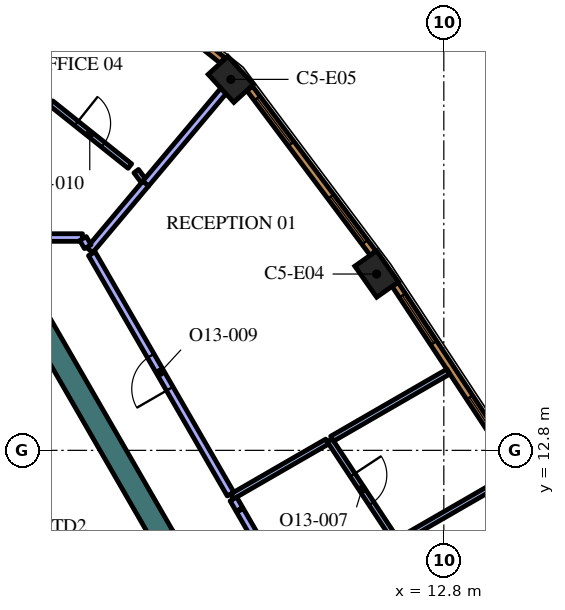
"""IFC4 building model, lengths in metres.
Left out: names, types, materials, properties, quantities, classifications, styles, units other than length and angle.
Written with IfcOpenShell. Run it as: python <this file> out.ifc"""

import sys

from ifc_helpers import new_model, si_unit, direction, frame, frame_2d, origin, origin_2d, place, context, subcontext, project, spatial, rectangle, extrude, element, fill, save


model = new_model("IFC4")
c1 = context("Model", 3, precision=1e-05, world=origin(), true_north=direction((0.0, 1.0)))
c2 = subcontext(c1, "Body", "Model", "MODEL_VIEW")
j1 = project(units=[si_unit("LENGTHUNIT", "METRE"), si_unit("PLANEANGLEUNIT", "RADIAN")], contexts=[c1])
p1 = place(None, origin())
s1 = spatial("IfcSite", under=j1, at=p1, CompositionType="ELEMENT")
p2 = place(p1, origin())
s2 = spatial("IfcBuilding", under=s1, at=p2, CompositionType="ELEMENT")
p3 = place(p2, frame((0.0, 0.0, 300.6)))
s3 = spatial("IfcBuildingStorey", under=s2, at=p3, CompositionType="ELEMENT", Elevation=300.6)
for number, where, z_axis, x_axis in (
    (1, (11.032, 17.44, 0.0), (0.0, 0.0, 1.0), (-0.575, 0.818, 0.0)),
    (2, (7.195, 22.561, 0.0), (0.0, 0.0, 1.0), (-0.676, 0.737, 0.0)),
):
    element("IfcColumn", number, at=place(p3, frame(where, z_axis=z_axis, x_axis=x_axis)), inside=s3, PredefinedType="COLUMN", context=c2, shape_type="SweptSolid", body=[
        extrude(rectangle(XDim=1.0, YDim=0.7, at=origin_2d()), origin(), (0.0, 0.0, 1.0), 4.2),
    ])
p4 = place(p3, frame((1.989, 16.456, 0.0), z_axis=(0.0, 0.0, 1.0), x_axis=(0.499973159588, -0.866040899549, 0.0)))
e3 = element("IfcWall", 3, at=p4, inside=s3, PredefinedType="SOLIDWALL", context=c2, shape_type="SweptSolid", body=[
    extrude(rectangle(XDim=6.828, YDim=0.6, at=frame_2d((3.414, 0.0))), origin(), (0.0, 0.0, 1.0), 4.2),
])
p5 = place(p3, frame((11.564, 10.387, 0.0), z_axis=(0.0, 0.0, 1.0), x_axis=(0.86604641216, 0.499963610661, 0.0)))
e4 = element("IfcWall", 4, at=p5, inside=s3, PredefinedType="PARTITIONING", context=c2, shape_type="SweptSolid", body=[
    extrude(rectangle(XDim=3.096, YDim=0.15, at=frame_2d((1.548, 0.0))), origin(), (0.0, 0.0, 1.0), 3.55),
])
p6 = place(p3, frame((9.795, 13.068, 0.0), z_axis=(0.0, 0.0, 1.0), x_axis=(0.550767347659, -0.834658809786, 0.0)))
e5 = element("IfcWall", 5, at=p6, inside=s3, PredefinedType="PARTITIONING", context=c2, shape_type="SweptSolid", body=[
    extrude(rectangle(XDim=2.999, YDim=0.15, at=frame_2d((1.5, 0.0))), origin(), (0.0, 0.0, 1.0), 3.55),
])
p7 = place(p6, frame((1.099, 0.0, 0.0)))
e6 = element("IfcOpeningElement", 6, at=p7, cuts=e5, PredefinedType="OPENING", context=c2, shape_type="SweptSolid", body=[
    extrude(rectangle(XDim=0.9, YDim=2.1, at=frame_2d((0.45, 1.05))), frame((0.0, 0.085, 0.0), z_axis=(0.0, -1.0, 0.0), x_axis=(1.0, 0.0, 0.0)), (0.0, 0.0, 1.0), 0.17),
])
p8 = place(p3, frame((9.86, 13.106, 0.0), z_axis=(0.0, 0.0, 1.0), x_axis=(0.866022094817, 0.500005731256, 0.0)))
e7 = element("IfcWall", 7, at=p8, inside=s3, PredefinedType="PARTITIONING", context=c2, shape_type="SweptSolid", body=[
    extrude(rectangle(XDim=3.531, YDim=0.15, at=frame_2d((1.766, 0.0))), origin(), (0.0, 0.0, 1.0), 3.55),
])
p9 = place(p3, frame((7.226, 11.585, 0.0), z_axis=(0.0, 0.0, 1.0), x_axis=(0.866021079084, 0.500007490527, 0.0)))
e8 = element("IfcWall", 8, at=p9, inside=s3, PredefinedType="PARTITIONING", context=c2, shape_type="SweptSolid", body=[
    extrude(rectangle(XDim=2.892, YDim=0.15, at=frame_2d((1.446, 0.0))), origin(), (0.0, 0.0, 1.0), 3.55),
])
p10 = place(p3, frame((13.436, 0.829, 0.0), z_axis=(0.0, 0.0, 1.0), x_axis=(-0.49999894854, 0.866026010844, 0.0)))
e9 = element("IfcWall", 9, at=p10, inside=s3, PredefinedType="PARTITIONING", context=c2, shape_type="SweptSolid", body=[
    extrude(rectangle(XDim=12.0, YDim=0.2, at=frame_2d((6.0, 0.0))), origin(), (0.0, 0.0, 1.0), 3.55),
])
p11 = place(p10, frame((5.5, 0.0, 0.0)))
e10 = element("IfcOpeningElement", 10, at=p11, cuts=e9, PredefinedType="OPENING", context=c2, shape_type="SweptSolid", body=[
    extrude(rectangle(XDim=1.0, YDim=2.1, at=frame_2d((0.5, 1.05))), frame((0.0, 0.11, 0.0), z_axis=(0.0, -1.0, 0.0), x_axis=(1.0, 0.0, 0.0)), (0.0, 0.0, 1.0), 0.22),
])
p12 = place(p3, frame((7.421, 11.247, 0.0), z_axis=(0.0, 0.0, 1.0), x_axis=(-0.500303403544, 0.865850162789, 0.0)))
e11 = element("IfcWall", 11, at=p12, inside=s3, PredefinedType="PARTITIONING", context=c2, shape_type="SweptSolid", body=[
    extrude(rectangle(XDim=0.315, YDim=0.2, at=frame_2d((0.158, 0.0))), origin(), (0.0, 0.0, 1.0), 3.55),
])
p13 = place(p3, frame((4.95, 19.814, 0.0), z_axis=(0.0, 0.0, 1.0), x_axis=(0.642981953866, 0.765881326971, 0.0)))
e12 = element("IfcWall", 12, at=p13, inside=s3, PredefinedType="PARTITIONING", context=c2, shape_type="SweptSolid", body=[
    extrude(rectangle(XDim=3.188, YDim=0.2, at=frame_2d((1.594, 0.0))), origin(), (0.0, 0.0, 1.0), 3.55),
])
p14 = place(p3, frame((3.483, 18.067, 0.0), z_axis=(0.0, 0.0, 1.0), x_axis=(0.642896944312, 0.765952687177, 0.0)))
e13 = element("IfcWall", 13, at=p14, inside=s3, PredefinedType="PARTITIONING", context=c2, shape_type="SweptSolid", body=[
    extrude(rectangle(XDim=2.29, YDim=0.2, at=frame_2d((1.145, 0.0))), origin(), (0.0, 0.0, 1.0), 3.55),
])
p15 = place(p3, frame((7.188, 11.65, 0.0), z_axis=(0.0, 0.0, 1.0), x_axis=(-0.499989634868, 0.866031388014, 0.0)))
e14 = element("IfcWall", 14, at=p15, inside=s3, PredefinedType="PARTITIONING", context=c2, shape_type="SweptSolid", body=[
    extrude(rectangle(XDim=7.303, YDim=0.2, at=frame_2d((3.652, 0.0))), origin(), (0.0, 0.0, 1.0), 3.55),
])
p16 = place(p15, frame((3.2, 0.0, 0.0)))
e15 = element("IfcOpeningElement", 15, at=p16, cuts=e14, PredefinedType="OPENING", context=c2, shape_type="SweptSolid", body=[
    extrude(rectangle(XDim=1.0, YDim=2.1, at=frame_2d((0.5, 1.05))), frame((0.0, 0.11, 0.0), z_axis=(0.0, -1.0, 0.0), x_axis=(1.0, 0.0, 0.0)), (0.0, 0.0, 1.0), 0.22),
])
p17 = place(p3, frame((4.891, 19.899, 0.0), z_axis=(0.0, 0.0, 1.0), x_axis=(-0.6, 0.8, 0.0)))
e16 = element("IfcWall", 16, at=p17, inside=s3, PredefinedType="PARTITIONING", context=c2, shape_type="SweptSolid", body=[
    extrude(rectangle(XDim=0.309, YDim=0.15, at=frame_2d((0.154, 0.0))), origin(), (0.0, 0.0, 1.0), 3.55),
])
p18 = place(p3, frame((2.462, 21.937, 0.0), z_axis=(0.0, 0.0, 1.0), x_axis=(0.781630346222, -0.62374193531, 0.0)))
e17 = element("IfcWall", 17, at=p18, inside=s3, PredefinedType="PARTITIONING", context=c2, shape_type="SweptSolid", body=[
    extrude(rectangle(XDim=2.656, YDim=0.15, at=frame_2d((1.328, 0.0))), origin(), (0.0, 0.0, 1.0), 3.55),
])
p19 = place(p18, frame((0.857, 0.0, 0.0)))
e18 = element("IfcOpeningElement", 18, at=p19, cuts=e17, PredefinedType="OPENING", context=c2, shape_type="SweptSolid", body=[
    extrude(rectangle(XDim=0.9, YDim=2.1, at=frame_2d((0.45, 1.05))), frame((0.0, 0.085, 0.0), z_axis=(0.0, -1.0, 0.0), x_axis=(1.0, 0.0, 0.0)), (0.0, 0.0, 1.0), 0.17),
])
p20 = place(p3, frame((3.291, 18.4, 0.0), z_axis=(0.0, 0.0, 1.0), x_axis=(-1.0, 0.0, 0.0)))
e19 = element("IfcWall", 19, at=p20, inside=s3, PredefinedType="PARTITIONING", context=c2, shape_type="SweptSolid", body=[
    extrude(rectangle(XDim=6.582, YDim=0.2, at=frame_2d((3.291, 0.0))), origin(), (0.0, 0.0, 1.0), 3.55),
])
p21 = place(p3, frame((3.43, 18.159, 0.0), z_axis=(0.0, 0.0, 1.0), x_axis=(-0.499949632511, 0.866054481515, 0.0)))
e20 = element("IfcWall", 20, at=p21, inside=s3, PredefinedType="PARTITIONING", context=c2, shape_type="SweptSolid", body=[
    extrude(rectangle(XDim=0.248, YDim=0.2, at=frame_2d((0.124, 0.0))), origin(), (0.0, 0.0, 1.0), 3.55),
])
p22 = place(p3, frame((14.496, 12.653, 0.0), z_axis=(0.0, 0.0, 1.0), x_axis=(-0.550744054781, 0.83467417962, 0.0)))
e21 = element("IfcWall", 21, at=p22, inside=s3, PredefinedType="SOLIDWALL", context=c2, shape_type="SweptSolid", body=[
    extrude(rectangle(XDim=5.406, YDim=0.19, at=frame_2d((2.703, 0.0))), origin(), (0.0, 0.0, 1.0), 3.95),
])
p23 = place(p22, frame((0.346, 0.0, 0.6)))
e22 = element("IfcOpeningElement", 22, at=p23, cuts=e21, PredefinedType="OPENING", context=c2, shape_type="SweptSolid", body=[
    extrude(rectangle(XDim=1.5, YDim=2.85, at=frame_2d((0.75, 1.425))), frame((0.0, 0.105, 0.0), z_axis=(0.0, -1.0, 0.0), x_axis=(1.0, 0.0, 0.0)), (0.0, 0.0, 1.0), 0.21),
])
p24 = place(p22, frame((3.559, 0.0, 0.6)))
e23 = element("IfcOpeningElement", 23, at=p24, cuts=e21, PredefinedType="OPENING", context=c2, shape_type="SweptSolid", body=[
    extrude(rectangle(XDim=1.5, YDim=2.85, at=frame_2d((0.75, 1.425))), frame((0.0, 0.105, 0.0), z_axis=(0.0, -1.0, 0.0), x_axis=(1.0, 0.0, 0.0)), (0.0, 0.0, 1.0), 0.21),
])
p25 = place(p3, frame((10.938, 17.99, 0.0), z_axis=(0.0, 0.0, 1.0), x_axis=(-0.599559865294, 0.800329911929, 0.0)))
e24 = element("IfcWall", 24, at=p25, inside=s3, PredefinedType="SOLIDWALL", context=c2, shape_type="SweptSolid", body=[
    extrude(rectangle(XDim=5.415, YDim=0.19, at=frame_2d((2.708, 0.0))), origin(), (0.0, 0.0, 1.0), 3.95),
])
p26 = place(p25, frame((0.358, 0.0, 0.6)))
e25 = element("IfcOpeningElement", 25, at=p26, cuts=e24, PredefinedType="OPENING", context=c2, shape_type="SweptSolid", body=[
    extrude(rectangle(XDim=1.5, YDim=2.85, at=frame_2d((0.75, 1.425))), frame((0.0, 0.105, 0.0), z_axis=(0.0, -1.0, 0.0), x_axis=(1.0, 0.0, 0.0)), (0.0, 0.0, 1.0), 0.21),
])
p27 = place(p25, frame((3.593, 0.0, 0.6)))
e26 = element("IfcOpeningElement", 26, at=p27, cuts=e24, PredefinedType="OPENING", context=c2, shape_type="SweptSolid", body=[
    extrude(rectangle(XDim=1.5, YDim=2.85, at=frame_2d((0.75, 1.425))), frame((0.0, 0.105, 0.0), z_axis=(0.0, -1.0, 0.0), x_axis=(1.0, 0.0, 0.0)), (0.0, 0.0, 1.0), 0.21),
])
p28 = place(p3, frame((6.977, 23.061, 0.0), z_axis=(0.0, 0.0, 1.0), x_axis=(-0.781626234064, 0.623747088349, 0.0)))
e27 = element("IfcWall", 27, at=p28, inside=s3, PredefinedType="SOLIDWALL", context=c2, shape_type="SweptSolid", body=[
    extrude(rectangle(XDim=3.237, YDim=0.19, at=frame_2d((1.618, 0.0))), origin(), (0.0, 0.0, 1.0), 3.95),
])
p29 = place(p28, frame((1.068, 0.0, 0.6)))
e28 = element("IfcOpeningElement", 28, at=p29, cuts=e27, PredefinedType="OPENING", context=c2, shape_type="SweptSolid", body=[
    extrude(rectangle(XDim=1.1, YDim=2.85, at=frame_2d((0.55, 1.425))), frame((0.0, 0.105, 0.0), z_axis=(0.0, -1.0, 0.0), x_axis=(1.0, 0.0, 0.0)), (0.0, 0.0, 1.0), 0.21),
])
p30 = place(p7, origin())
e29 = element("IfcDoor", 29, at=p30, inside=s3, OperationType="SINGLE_SWING_RIGHT", PredefinedType="DOOR", context=c2, shape_type="SweptSolid", body=[
    extrude(rectangle(XDim=0.9, YDim=2.1, at=frame_2d((0.45, 1.05))), frame((0.0, 0.025, 0.0), z_axis=(0.0, -1.0, 0.0), x_axis=(1.0, 0.0, 0.0)), (0.0, 0.0, 1.0), 0.05),
])
fill(e6, e29)
p31 = place(p16, origin())
e30 = element("IfcDoor", 30, at=p31, inside=s3, OperationType="SINGLE_SWING_RIGHT", PredefinedType="DOOR", context=c2, shape_type="SweptSolid", body=[
    extrude(rectangle(XDim=1.0, YDim=2.1, at=frame_2d((0.5, 1.05))), frame((0.0, 0.025, 0.0), z_axis=(0.0, -1.0, 0.0), x_axis=(1.0, 0.0, 0.0)), (0.0, 0.0, 1.0), 0.05),
])
fill(e15, e30)
p32 = place(p19, origin())
e31 = element("IfcDoor", 31, at=p32, inside=s3, OperationType="SINGLE_SWING_LEFT", PredefinedType="DOOR", context=c2, shape_type="SweptSolid", body=[
    extrude(rectangle(XDim=0.9, YDim=2.1, at=frame_2d((0.45, 1.05))), frame((0.0, 0.025, 0.0), z_axis=(0.0, -1.0, 0.0), x_axis=(1.0, 0.0, 0.0)), (0.0, 0.0, 1.0), 0.05),
])
fill(e18, e31)
p33 = place(p23, origin())
e32 = element("IfcWindow", 32, at=p33, inside=s3, PartitioningType="SINGLE_PANEL", PredefinedType="WINDOW", context=c2, shape_type="SweptSolid", body=[
    extrude(rectangle(XDim=1.5, YDim=2.85, at=frame_2d((0.75, 1.425))), frame((0.0, 0.045, 0.0), z_axis=(0.0, -1.0, 0.0), x_axis=(1.0, 0.0, 0.0)), (0.0, 0.0, 1.0), 0.06),
])
fill(e22, e32)
p34 = place(p24, origin())
e33 = element("IfcWindow", 33, at=p34, inside=s3, PartitioningType="SINGLE_PANEL", PredefinedType="WINDOW", context=c2, shape_type="SweptSolid", body=[
    extrude(rectangle(XDim=1.5, YDim=2.85, at=frame_2d((0.75, 1.425))), frame((0.0, 0.045, 0.0), z_axis=(0.0, -1.0, 0.0), x_axis=(1.0, 0.0, 0.0)), (0.0, 0.0, 1.0), 0.06),
])
fill(e23, e33)
p35 = place(p26, origin())
e34 = element("IfcWindow", 34, at=p35, inside=s3, PartitioningType="SINGLE_PANEL", PredefinedType="WINDOW", context=c2, shape_type="SweptSolid", body=[
    extrude(rectangle(XDim=1.5, YDim=2.85, at=frame_2d((0.75, 1.425))), frame((0.0, 0.045, 0.0), z_axis=(0.0, -1.0, 0.0), x_axis=(1.0, 0.0, 0.0)), (0.0, 0.0, 1.0), 0.06),
])
fill(e25, e34)
p36 = place(p27, origin())
e35 = element("IfcWindow", 35, at=p36, inside=s3, PartitioningType="SINGLE_PANEL", PredefinedType="WINDOW", context=c2, shape_type="SweptSolid", body=[
    extrude(rectangle(XDim=1.5, YDim=2.85, at=frame_2d((0.75, 1.425))), frame((0.0, 0.045, 0.0), z_axis=(0.0, -1.0, 0.0), x_axis=(1.0, 0.0, 0.0)), (0.0, 0.0, 1.0), 0.06),
])
fill(e26, e35)
save(model, sys.argv[1])
